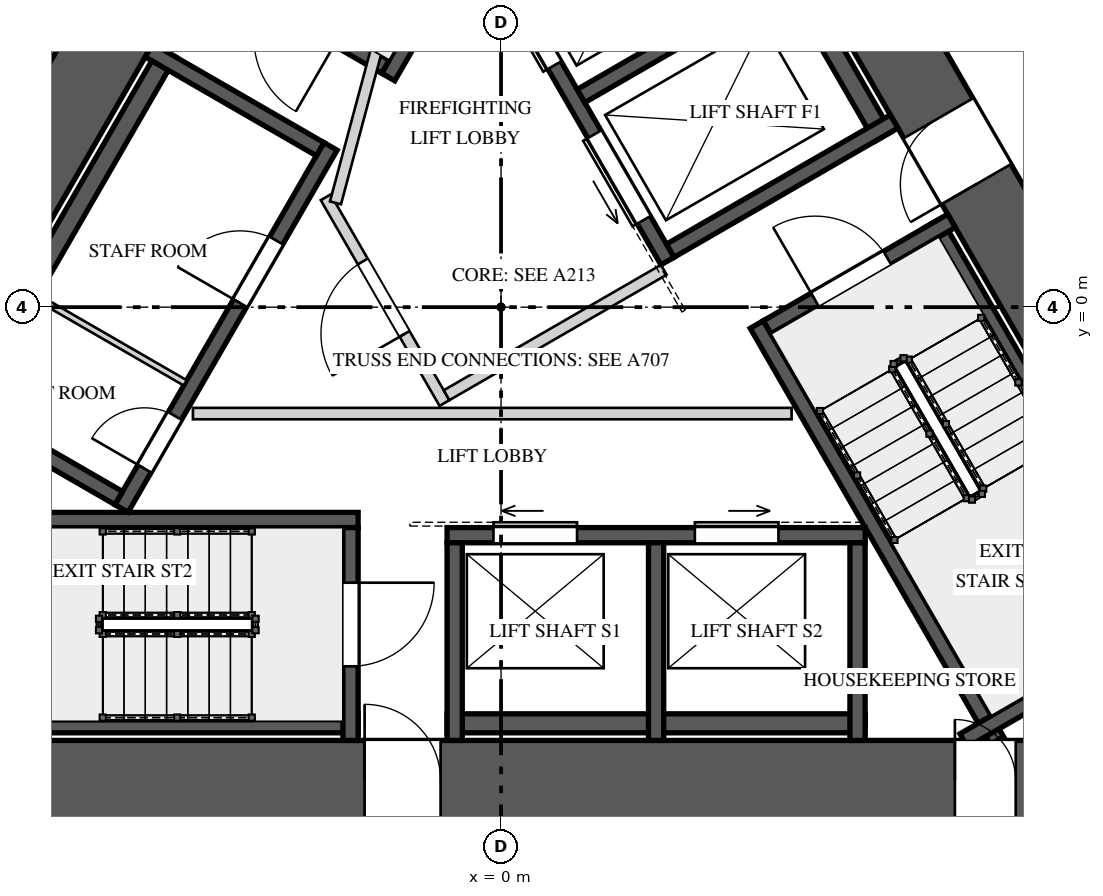
"""IFC4 building model, lengths in metres.
Left out: names, types, materials, properties, quantities, classifications, styles, units other than length and angle.
Written with IfcOpenShell. Run it as: python <this file> out.ifc"""

import sys

from ifc_helpers import new_model, si_unit, direction, frame, frame_2d, origin, place, context, subcontext, project, spatial, rectangle, extrude, element, fill, save


model = new_model("IFC4")
c1 = context("Model", 3, precision=1e-05, world=origin(), true_north=direction((0.0, 1.0)))
c2 = subcontext(c1, "Body", "Model", "MODEL_VIEW")
j1 = project(units=[si_unit("LENGTHUNIT", "METRE"), si_unit("PLANEANGLEUNIT", "RADIAN")], contexts=[c1])
p1 = place(None, origin())
s1 = spatial("IfcSite", under=j1, at=p1, CompositionType="ELEMENT")
p2 = place(p1, origin())
s2 = spatial("IfcBuilding", under=s1, at=p2, CompositionType="ELEMENT")
p3 = place(p2, frame((0.0, 0.0, 83.2)))
s3 = spatial("IfcBuildingStorey", under=s2, at=p3, CompositionType="ELEMENT", Elevation=83.2)
p4 = place(p3, frame((-1.14, 10.475, 0.0), z_axis=(0.0, 0.0, 1.0), x_axis=(-0.499985955615, -0.866033512162, 0.0)))
e1 = element("IfcWall", 1, at=p4, inside=s3, PredefinedType="SHEAR", context=c2, shape_type="SweptSolid", body=[
    extrude(rectangle(XDim=17.003, YDim=1.05, at=frame_2d((8.501, 0.0))), origin(), (0.0, 0.0, 1.0), 5.2),
])
p5 = place(p4, frame((6.707, 0.0, 0.0)))
e2 = element("IfcOpeningElement", 2, at=p5, cuts=e1, PredefinedType="OPENING", context=c2, shape_type="SweptSolid", body=[
    extrude(rectangle(XDim=1.0, YDim=2.4, at=frame_2d((0.5, 1.2))), frame((0.0, 0.535, 0.0), z_axis=(0.0, -1.0, 0.0), x_axis=(1.0, 0.0, 0.0)), (0.0, 0.0, 1.0), 1.07),
])
p6 = place(p3, frame((-8.501, -6.225, 0.0), z_axis=(0.0, 0.0, 1.0), x_axis=(1.0, 0.0, 0.0)))
e3 = element("IfcWall", 3, at=p6, inside=s3, PredefinedType="SHEAR", context=c2, shape_type="SweptSolid", body=[
    extrude(rectangle(XDim=17.003, YDim=1.05, at=frame_2d((8.501, 0.0))), origin(), (0.0, 0.0, 1.0), 5.2),
])
p7 = place(p6, frame((6.707, 0.0, 0.0)))
e4 = element("IfcOpeningElement", 4, at=p7, cuts=e3, PredefinedType="OPENING", context=c2, shape_type="SweptSolid", body=[
    extrude(rectangle(XDim=1.0, YDim=2.4, at=frame_2d((0.5, 1.2))), frame((0.0, 0.535, 0.0), z_axis=(0.0, -1.0, 0.0), x_axis=(1.0, 0.0, 0.0)), (0.0, 0.0, 1.0), 1.07),
])
p8 = place(p6, frame((14.472, 0.0, 0.0)))
e5 = element("IfcOpeningElement", 5, at=p8, cuts=e3, PredefinedType="OPENING", context=c2, shape_type="SweptSolid", body=[
    extrude(rectangle(XDim=0.8, YDim=2.1, at=frame_2d((0.4, 1.05))), frame((0.0, 0.535, 0.0), z_axis=(0.0, -1.0, 0.0), x_axis=(1.0, 0.0, 0.0)), (0.0, 0.0, 1.0), 1.07),
])
p9 = place(p3, frame((9.642, -4.25, 0.0), z_axis=(0.0, 0.0, 1.0), x_axis=(-0.499985955615, 0.866033512162, 0.0)))
e6 = element("IfcWall", 6, at=p9, inside=s3, PredefinedType="SHEAR", context=c2, shape_type="SweptSolid", body=[
    extrude(rectangle(XDim=17.003, YDim=1.05, at=frame_2d((8.501, 0.0))), origin(), (0.0, 0.0, 1.0), 5.2),
])
p10 = place(p9, frame((6.776, 0.0, 0.0)))
e7 = element("IfcOpeningElement", 7, at=p10, cuts=e6, PredefinedType="OPENING", context=c2, shape_type="SweptSolid", body=[
    extrude(rectangle(XDim=1.0, YDim=2.4, at=frame_2d((0.5, 1.2))), frame((0.0, 0.535, 0.0), z_axis=(0.0, -1.0, 0.0), x_axis=(1.0, 0.0, 0.0)), (0.0, 0.0, 1.0), 1.07),
])
p11 = place(p9, frame((13.967, 0.0, 0.0)))
e8 = element("IfcOpeningElement", 8, at=p11, cuts=e6, PredefinedType="OPENING", context=c2, shape_type="SweptSolid", body=[
    extrude(rectangle(XDim=0.8, YDim=2.1, at=frame_2d((0.4, 1.05))), frame((0.0, 0.535, 0.0), z_axis=(0.0, -1.0, 0.0), x_axis=(1.0, 0.0, 0.0)), (0.0, 0.0, 1.0), 1.07),
])
p12 = place(p3, frame((1.674, 8.5, 0.0), z_axis=(0.0, 0.0, 1.0), x_axis=(-0.499995607161, -0.866027939976, 0.0)))
e9 = element("IfcWall", 9, at=p12, inside=s3, PredefinedType="SOLIDWALL", context=c2, shape_type="SweptSolid", body=[
    extrude(rectangle(XDim=6.318, YDim=0.2, at=frame_2d((3.159, 0.0))), origin(), (0.0, 0.0, 1.0), 4.85),
])
p13 = place(p3, frame((-1.521, 3.165, 0.0), z_axis=(0.0, 0.0, 1.0), x_axis=(-0.866034573852, 0.49998411664, 0.0)))
e10 = element("IfcWall", 10, at=p13, inside=s3, PredefinedType="SOLIDWALL", context=c2, shape_type="SweptSolid", body=[
    extrude(rectangle(XDim=2.8, YDim=0.2, at=frame_2d((1.4, 0.0))), origin(), (0.0, 0.0, 1.0), 4.85),
])
p14 = place(p13, frame((0.725, 0.0, 0.0)))
e11 = element("IfcOpeningElement", 11, at=p14, cuts=e10, PredefinedType="OPENING", context=c2, shape_type="SweptSolid", body=[
    extrude(rectangle(XDim=1.1, YDim=2.4, at=frame_2d((0.55, 1.2))), frame((0.0, 0.11, 0.0), z_axis=(0.0, -1.0, 0.0), x_axis=(1.0, 0.0, 0.0)), (0.0, 0.0, 1.0), 0.22),
])
p15 = place(p3, frame((-8.08, -5.475, 0.0), z_axis=(0.0, 0.0, 1.0), x_axis=(1.0, 0.0, 0.0)))
e12 = element("IfcWall", 12, at=p15, inside=s3, PredefinedType="SOLIDWALL", context=c2, shape_type="SweptSolid", body=[
    extrude(rectangle(XDim=6.2, YDim=0.25, at=frame_2d((3.1, 0.0))), origin(), (0.0, 0.0, 1.0), 4.85),
])
p16 = place(p3, frame((-8.198, -2.8, 0.0), z_axis=(0.0, 0.0, 1.0), x_axis=(1.0, 0.0, 0.0)))
e13 = element("IfcWall", 13, at=p16, inside=s3, PredefinedType="SOLIDWALL", context=c2, shape_type="SweptSolid", body=[
    extrude(rectangle(XDim=6.319, YDim=0.2, at=frame_2d((3.159, 0.0))), origin(), (0.0, 0.0, 1.0), 4.85),
])
p17 = place(p3, frame((-1.98, -2.9, 0.0), z_axis=(0.0, 0.0, 1.0), x_axis=(0.0, -1.0, 0.0)))
e14 = element("IfcWall", 14, at=p17, inside=s3, PredefinedType="SOLIDWALL", context=c2, shape_type="SweptSolid", body=[
    extrude(rectangle(XDim=2.8, YDim=0.2, at=frame_2d((1.4, 0.0))), origin(), (0.0, 0.0, 1.0), 4.85),
])
p18 = place(p17, frame((0.725, 0.0, 0.0)))
e15 = element("IfcOpeningElement", 15, at=p18, cuts=e14, PredefinedType="OPENING", context=c2, shape_type="SweptSolid", body=[
    extrude(rectangle(XDim=1.1, YDim=2.4, at=frame_2d((0.55, 1.2))), frame((0.0, 0.11, 0.0), z_axis=(0.0, -1.0, 0.0), x_axis=(1.0, 0.0, 0.0)), (0.0, 0.0, 1.0), 0.22),
])
p19 = place(p3, frame((8.781, -4.26, 0.0), z_axis=(0.0, 0.0, 1.0), x_axis=(-0.500009909098, 0.866019682689, 0.0)))
e16 = element("IfcWall", 16, at=p19, inside=s3, PredefinedType="SOLIDWALL", context=c2, shape_type="SweptSolid", body=[
    extrude(rectangle(XDim=6.2, YDim=0.25, at=frame_2d((3.1, 0.0))), origin(), (0.0, 0.0, 1.0), 4.85),
])
p20 = place(p3, frame((6.524, -5.7, 0.0), z_axis=(0.0, 0.0, 1.0), x_axis=(-0.499995607161, 0.866027939976, 0.0)))
e17 = element("IfcWall", 17, at=p20, inside=s3, PredefinedType="SOLIDWALL", context=c2, shape_type="SweptSolid", body=[
    extrude(rectangle(XDim=6.318, YDim=0.2, at=frame_2d((3.159, 0.0))), origin(), (0.0, 0.0, 1.0), 4.85),
])
p21 = place(p3, frame((6.087, -5.7, 0.0), z_axis=(0.0, 0.0, 1.0), x_axis=(0.866006986733, 0.500031897912, 0.0)))
e18 = element("IfcWall", 18, at=p21, inside=s3, PredefinedType="SOLIDWALL", context=c2, shape_type="SweptSolid", body=[
    extrude(rectangle(XDim=3.278, YDim=0.2, at=frame_2d((1.639, 0.0))), origin(), (0.0, 0.0, 1.0), 4.85),
])
p22 = place(p3, frame((3.501, -0.265, 0.0), z_axis=(0.0, 0.0, 1.0), x_axis=(0.866034573852, 0.49998411664, 0.0)))
e19 = element("IfcWall", 19, at=p22, inside=s3, PredefinedType="SOLIDWALL", context=c2, shape_type="SweptSolid", body=[
    extrude(rectangle(XDim=2.8, YDim=0.2, at=frame_2d((1.4, 0.0))), origin(), (0.0, 0.0, 1.0), 4.85),
])
p23 = place(p22, frame((0.725, 0.0, 0.0)))
e20 = element("IfcOpeningElement", 20, at=p23, cuts=e19, PredefinedType="OPENING", context=c2, shape_type="SweptSolid", body=[
    extrude(rectangle(XDim=1.1, YDim=2.4, at=frame_2d((0.55, 1.2))), frame((0.0, 0.11, 0.0), z_axis=(0.0, -1.0, 0.0), x_axis=(1.0, 0.0, 0.0)), (0.0, 0.0, 1.0), 0.22),
])
p24 = place(p3, frame((-4.993, -2.648, 0.0), z_axis=(0.0, 0.0, 1.0), x_axis=(0.499996545922, 0.866027397988, 0.0)))
e21 = element("IfcWall", 21, at=p24, inside=s3, PredefinedType="SOLIDWALL", context=c2, shape_type="SweptSolid", body=[
    extrude(rectangle(XDim=5.5, YDim=0.2, at=frame_2d((2.75, 0.0))), origin(), (0.0, 0.0, 1.0), 4.85),
])
p25 = place(p24, frame((3.12, 0.0, 0.0)))
e22 = element("IfcOpeningElement", 22, at=p25, cuts=e21, PredefinedType="OPENING", context=c2, shape_type="SweptSolid", body=[
    extrude(rectangle(XDim=0.95, YDim=2.4, at=frame_2d((0.475, 1.2))), frame((0.0, 0.11, 0.0), z_axis=(0.0, -1.0, 0.0), x_axis=(1.0, 0.0, 0.0)), (0.0, 0.0, 1.0), 0.22),
])
p26 = place(p24, frame((0.605, 0.0, 0.0)))
e23 = element("IfcOpeningElement", 23, at=p26, cuts=e21, PredefinedType="OPENING", context=c2, shape_type="SweptSolid", body=[
    extrude(rectangle(XDim=0.8, YDim=2.1, at=frame_2d((0.4, 1.05))), frame((0.0, 0.11, 0.0), z_axis=(0.0, -1.0, 0.0), x_axis=(1.0, 0.0, 0.0)), (0.0, 0.0, 1.0), 0.22),
])
p27 = place(p3, frame((-4.386, 3.352, 0.0), z_axis=(0.0, 0.0, 1.0), x_axis=(-0.500015767406, -0.866016300277, 0.0)))
e24 = element("IfcWall", 24, at=p27, inside=s3, PredefinedType="SOLIDWALL", context=c2, shape_type="SweptSolid", body=[
    extrude(rectangle(XDim=5.5, YDim=0.25, at=frame_2d((2.75, 0.0))), origin(), (0.0, 0.0, 1.0), 4.85),
])
for number, where, z_axis, x_axis in (
    (25, (-2.38, 2.078, 0.0), (0.0, 0.0, 1.0), (-0.866, 0.5, 0.0)),
    (26, (-5.03, -2.512, 0.0), (0.0, 0.0, 1.0), (-0.866, 0.5, 0.0)),
):
    element("IfcWall", number, at=place(p3, frame(where, z_axis=z_axis, x_axis=x_axis)), inside=s3, PredefinedType="SOLIDWALL", context=c2, shape_type="SweptSolid", body=[
        extrude(rectangle(XDim=2.6, YDim=0.2, at=frame_2d((1.3, 0.0))), origin(), (0.0, 0.0, 1.0), 4.85),
    ])
p28 = place(p3, frame((-4.155, -0.996, 0.0), z_axis=(0.0, 0.0, 1.0), x_axis=(-0.866016039709, 0.500016218704, 0.0)))
e27 = element("IfcWall", 27, at=p28, inside=s3, PredefinedType="PARTITIONING", context=c2, shape_type="SweptSolid", body=[
    extrude(rectangle(XDim=2.35, YDim=0.08, at=frame_2d((1.175, 0.0))), origin(), (0.0, 0.0, 1.0), 4.85),
])
p29 = place(p3, frame((-0.71, -3.0, 0.0), z_axis=(0.0, 0.0, 1.0), x_axis=(1.0, 0.0, 0.0)))
e28 = element("IfcWall", 28, at=p29, inside=s3, PredefinedType="SOLIDWALL", context=c2, shape_type="SweptSolid", body=[
    extrude(rectangle(XDim=5.5, YDim=0.2, at=frame_2d((2.75, 0.0))), origin(), (0.0, 0.0, 1.0), 4.85),
])
p30 = place(p29, frame((0.61, 0.0, 0.0)))
e29 = element("IfcOpeningElement", 29, at=p30, cuts=e28, PredefinedType="OPENING", context=c2, shape_type="SweptSolid", body=[
    extrude(rectangle(XDim=1.1, YDim=2.1, at=frame_2d((0.55, 1.05))), frame((0.0, 0.11, 0.0), z_axis=(0.0, -1.0, 0.0), x_axis=(1.0, 0.0, 0.0)), (0.0, 0.0, 1.0), 0.22),
])
p31 = place(p29, frame((3.26, 0.0, 0.0)))
e30 = element("IfcOpeningElement", 30, at=p31, cuts=e28, PredefinedType="OPENING", context=c2, shape_type="SweptSolid", body=[
    extrude(rectangle(XDim=1.1, YDim=2.1, at=frame_2d((0.55, 1.05))), frame((0.0, 0.11, 0.0), z_axis=(0.0, -1.0, 0.0), x_axis=(1.0, 0.0, 0.0)), (0.0, 0.0, 1.0), 0.22),
])
p32 = place(p3, frame((-0.71, -5.475, 0.0), z_axis=(0.0, 0.0, 1.0), x_axis=(1.0, 0.0, 0.0)))
e31 = element("IfcWall", 31, at=p32, inside=s3, PredefinedType="SOLIDWALL", context=c2, shape_type="SweptSolid", body=[
    extrude(rectangle(XDim=5.5, YDim=0.25, at=frame_2d((2.75, 0.0))), origin(), (0.0, 0.0, 1.0), 4.85),
])
for number, where, z_axis, x_axis in (
    (32, (-0.61, -3.1, 0.0), (0.0, 0.0, 1.0), (0.0, -1.0, 0.0)),
    (33, (2.04, -3.1, 0.0), (0.0, 0.0, 1.0), (0.0, -1.0, 0.0)),
    (34, (4.69, -3.1, 0.0), (0.0, 0.0, 1.0), (0.0, -1.0, 0.0)),
):
    element("IfcWall", number, at=place(p3, frame(where, z_axis=z_axis, x_axis=x_axis)), inside=s3, PredefinedType="SOLIDWALL", context=c2, shape_type="SweptSolid", body=[
        extrude(rectangle(XDim=2.6, YDim=0.2, at=frame_2d((1.3, 0.0))), origin(), (0.0, 0.0, 1.0), 4.85),
    ])
p33 = place(p3, frame((2.19, 0.606, 0.0), z_axis=(0.0, 0.0, 1.0), x_axis=(-0.500002801628, 0.866023786258, 0.0)))
e35 = element("IfcWall", 35, at=p33, inside=s3, PredefinedType="SOLIDWALL", context=c2, shape_type="SweptSolid", body=[
    extrude(rectangle(XDim=4.9, YDim=0.2, at=frame_2d((2.45, 0.0))), origin(), (0.0, 0.0, 1.0), 4.85),
])
p34 = place(p33, frame((0.625, 0.0, 0.0)))
e36 = element("IfcOpeningElement", 36, at=p34, cuts=e35, PredefinedType="OPENING", context=c2, shape_type="SweptSolid", body=[
    extrude(rectangle(XDim=1.3, YDim=2.1, at=frame_2d((0.65, 1.05))), frame((0.0, 0.11, 0.0), z_axis=(0.0, -1.0, 0.0), x_axis=(1.0, 0.0, 0.0)), (0.0, 0.0, 1.0), 0.22),
])
p35 = place(p33, frame((2.975, 0.0, 0.0)))
e37 = element("IfcOpeningElement", 37, at=p35, cuts=e35, PredefinedType="OPENING", context=c2, shape_type="SweptSolid", body=[
    extrude(rectangle(XDim=1.3, YDim=2.1, at=frame_2d((0.65, 1.05))), frame((0.0, 0.11, 0.0), z_axis=(0.0, -1.0, 0.0), x_axis=(1.0, 0.0, 0.0)), (0.0, 0.0, 1.0), 0.22),
])
p36 = place(p3, frame((5.026, 2.244, 0.0), z_axis=(0.0, 0.0, 1.0), x_axis=(-0.500002801628, 0.866023786258, 0.0)))
e38 = element("IfcWall", 38, at=p36, inside=s3, PredefinedType="SOLIDWALL", context=c2, shape_type="SweptSolid", body=[
    extrude(rectangle(XDim=4.9, YDim=0.25, at=frame_2d((2.45, 0.0))), origin(), (0.0, 0.0, 1.0), 4.85),
])
for number, where, z_axis, x_axis in (
    (39, (2.227, 0.743, 0.0), (0.0, 0.0, 1.0), (0.866, 0.5, 0.0)),
    (40, (1.052, 2.778, 0.0), (0.0, 0.0, 1.0), (0.866, 0.5, 0.0)),
):
    element("IfcWall", number, at=place(p3, frame(where, z_axis=z_axis, x_axis=x_axis)), inside=s3, PredefinedType="SOLIDWALL", context=c2, shape_type="SweptSolid", body=[
        extrude(rectangle(XDim=3.4, YDim=0.2, at=frame_2d((1.7, 0.0))), origin(), (0.0, 0.0, 1.0), 4.85),
    ])
p37 = place(p3, frame((-0.744, -1.261, 0.0), z_axis=(0.0, 0.0, 1.0), x_axis=(-0.500004234368, 0.866022959057, 0.0)))
e41 = element("IfcWall", 41, at=p37, inside=s3, PredefinedType="PARTITIONING", context=c2, shape_type="SweptSolid", body=[
    extrude(rectangle(XDim=3.125, YDim=0.15, at=frame_2d((1.562, 0.0))), origin(), (0.0, 0.0, 1.0), 4.85),
])
p38 = place(p37, frame((1.05, 0.0, 0.0)))
e42 = element("IfcOpeningElement", 42, at=p38, cuts=e41, PredefinedType="OPENING", context=c2, shape_type="SweptSolid", body=[
    extrude(rectangle(XDim=1.1, YDim=2.4, at=frame_2d((0.55, 1.2))), frame((0.0, 0.085, 0.0), z_axis=(0.0, -1.0, 0.0), x_axis=(1.0, 0.0, 0.0)), (0.0, 0.0, 1.0), 0.17),
])
p39 = place(p3, frame((-0.717, -1.159, 0.0), z_axis=(0.0, 0.0, 1.0), x_axis=(0.866008176907, 0.50002983664, 0.0)))
e43 = element("IfcWall", 43, at=p39, inside=s3, PredefinedType="PARTITIONING", context=c2, shape_type="SweptSolid", body=[
    extrude(rectangle(XDim=3.3, YDim=0.15, at=frame_2d((1.65, 0.0))), origin(), (0.0, 0.0, 1.0), 4.85),
])
p40 = place(p3, frame((-2.178, 1.372, 0.0), z_axis=(0.0, 0.0, 1.0), x_axis=(0.258808958833, 0.96592852884, 0.0)))
e44 = element("IfcWall", 44, at=p40, inside=s3, PredefinedType="PARTITIONING", context=c2, shape_type="SweptSolid", body=[
    extrude(rectangle(XDim=2.903, YDim=0.15, at=frame_2d((1.451, 0.0))), origin(), (0.0, 0.0, 1.0), 4.85),
])
p41 = place(p3, frame((-4.053, -1.4, 0.0), z_axis=(0.0, 0.0, 1.0), x_axis=(1.0, 0.0, 0.0)))
e45 = element("IfcWall", 45, at=p41, inside=s3, PredefinedType="PARTITIONING", context=c2, shape_type="SweptSolid", body=[
    extrude(rectangle(XDim=7.876, YDim=0.15, at=frame_2d((3.938, 0.0))), origin(), (0.0, 0.0, 1.0), 4.85),
])
p42 = place(p18, origin())
e46 = element("IfcDoor", 46, at=p42, inside=s3, OperationType="SINGLE_SWING_LEFT", PredefinedType="DOOR", context=c2, shape_type="SweptSolid", body=[
    extrude(rectangle(XDim=1.1, YDim=2.4, at=frame_2d((0.55, 1.2))), frame((0.0, 0.025, 0.0), z_axis=(0.0, -1.0, 0.0), x_axis=(1.0, 0.0, 0.0)), (0.0, 0.0, 1.0), 0.05),
])
fill(e15, e46)
p43 = place(p23, origin())
e47 = element("IfcDoor", 47, at=p43, inside=s3, OperationType="SINGLE_SWING_RIGHT", PredefinedType="DOOR", context=c2, shape_type="SweptSolid", body=[
    extrude(rectangle(XDim=1.1, YDim=2.4, at=frame_2d((0.55, 1.2))), frame((0.0, 0.025, 0.0), z_axis=(0.0, -1.0, 0.0), x_axis=(1.0, 0.0, 0.0)), (0.0, 0.0, 1.0), 0.05),
])
fill(e20, e47)
p44 = place(p25, origin())
e48 = element("IfcDoor", 48, at=p44, inside=s3, OperationType="SINGLE_SWING_LEFT", PredefinedType="DOOR", context=c2, shape_type="SweptSolid", body=[
    extrude(rectangle(XDim=0.95, YDim=2.4, at=frame_2d((0.475, 1.2))), frame((0.0, 0.025, 0.0), z_axis=(0.0, -1.0, 0.0), x_axis=(1.0, 0.0, 0.0)), (0.0, 0.0, 1.0), 0.05),
])
fill(e22, e48)
p45 = place(p26, origin())
e49 = element("IfcDoor", 49, at=p45, inside=s3, OperationType="SINGLE_SWING_RIGHT", PredefinedType="DOOR", context=c2, shape_type="SweptSolid", body=[
    extrude(rectangle(XDim=0.8, YDim=2.1, at=frame_2d((0.4, 1.05))), frame((0.0, 0.025, 0.0), z_axis=(0.0, -1.0, 0.0), x_axis=(1.0, 0.0, 0.0)), (0.0, 0.0, 1.0), 0.05),
])
fill(e23, e49)
p46 = place(p30, origin())
e50 = element("IfcDoor", 50, at=p46, inside=s3, OperationType="SLIDING_TO_LEFT", PredefinedType="DOOR", context=c2, shape_type="SweptSolid", body=[
    extrude(rectangle(XDim=1.1, YDim=2.1, at=frame_2d((0.55, 1.05))), frame((0.0, 0.025, 0.0), z_axis=(0.0, -1.0, 0.0), x_axis=(1.0, 0.0, 0.0)), (0.0, 0.0, 1.0), 0.05),
])
fill(e29, e50)
p47 = place(p31, origin())
e51 = element("IfcDoor", 51, at=p47, inside=s3, OperationType="SLIDING_TO_RIGHT", PredefinedType="DOOR", context=c2, shape_type="SweptSolid", body=[
    extrude(rectangle(XDim=1.1, YDim=2.1, at=frame_2d((0.55, 1.05))), frame((0.0, 0.025, 0.0), z_axis=(0.0, -1.0, 0.0), x_axis=(1.0, 0.0, 0.0)), (0.0, 0.0, 1.0), 0.05),
])
fill(e30, e51)
p48 = place(p34, origin())
e52 = element("IfcDoor", 52, at=p48, inside=s3, OperationType="SLIDING_TO_LEFT", PredefinedType="DOOR", context=c2, shape_type="SweptSolid", body=[
    extrude(rectangle(XDim=1.3, YDim=2.1, at=frame_2d((0.65, 1.05))), frame((0.0, 0.025, 0.0), z_axis=(0.0, -1.0, 0.0), x_axis=(1.0, 0.0, 0.0)), (0.0, 0.0, 1.0), 0.05),
])
fill(e36, e52)
p49 = place(p35, origin())
e53 = element("IfcDoor", 53, at=p49, inside=s3, OperationType="SLIDING_TO_RIGHT", PredefinedType="DOOR", context=c2, shape_type="SweptSolid", body=[
    extrude(rectangle(XDim=1.3, YDim=2.1, at=frame_2d((0.65, 1.05))), frame((0.0, 0.025, 0.0), z_axis=(0.0, -1.0, 0.0), x_axis=(1.0, 0.0, 0.0)), (0.0, 0.0, 1.0), 0.05),
])
fill(e37, e53)
p50 = place(p38, origin())
e54 = element("IfcDoor", 54, at=p50, inside=s3, OperationType="SINGLE_SWING_LEFT", PredefinedType="DOOR", context=c2, shape_type="SweptSolid", body=[
    extrude(rectangle(XDim=1.1, YDim=2.4, at=frame_2d((0.55, 1.2))), frame((0.0, 0.025, 0.0), z_axis=(0.0, -1.0, 0.0), x_axis=(1.0, 0.0, 0.0)), (0.0, 0.0, 1.0), 0.05),
])
fill(e42, e54)
p51 = place(p7, origin())
e55 = element("IfcDoor", 55, at=p51, inside=s3, OperationType="SINGLE_SWING_LEFT", PredefinedType="DOOR", context=c2, shape_type="SweptSolid", body=[
    extrude(rectangle(XDim=1.0, YDim=2.4, at=frame_2d((0.5, 1.2))), frame((0.0, 0.025, 0.0), z_axis=(0.0, -1.0, 0.0), x_axis=(1.0, 0.0, 0.0)), (0.0, 0.0, 1.0), 0.05),
])
fill(e4, e55)
p52 = place(p10, origin())
e56 = element("IfcDoor", 56, at=p52, inside=s3, OperationType="SINGLE_SWING_RIGHT", PredefinedType="DOOR", context=c2, shape_type="SweptSolid", body=[
    extrude(rectangle(XDim=1.0, YDim=2.4, at=frame_2d((0.5, 1.2))), frame((0.0, 0.025, 0.0), z_axis=(0.0, -1.0, 0.0), x_axis=(1.0, 0.0, 0.0)), (0.0, 0.0, 1.0), 0.05),
])
fill(e7, e56)
p53 = place(p8, origin())
e57 = element("IfcDoor", 57, at=p53, inside=s3, OperationType="SINGLE_SWING_LEFT", PredefinedType="DOOR", context=c2, shape_type="SweptSolid", body=[
    extrude(rectangle(XDim=0.8, YDim=2.1, at=frame_2d((0.4, 1.05))), frame((0.0, 0.025, 0.0), z_axis=(0.0, -1.0, 0.0), x_axis=(1.0, 0.0, 0.0)), (0.0, 0.0, 1.0), 0.05),
])
fill(e5, e57)
save(model, sys.argv[1])
